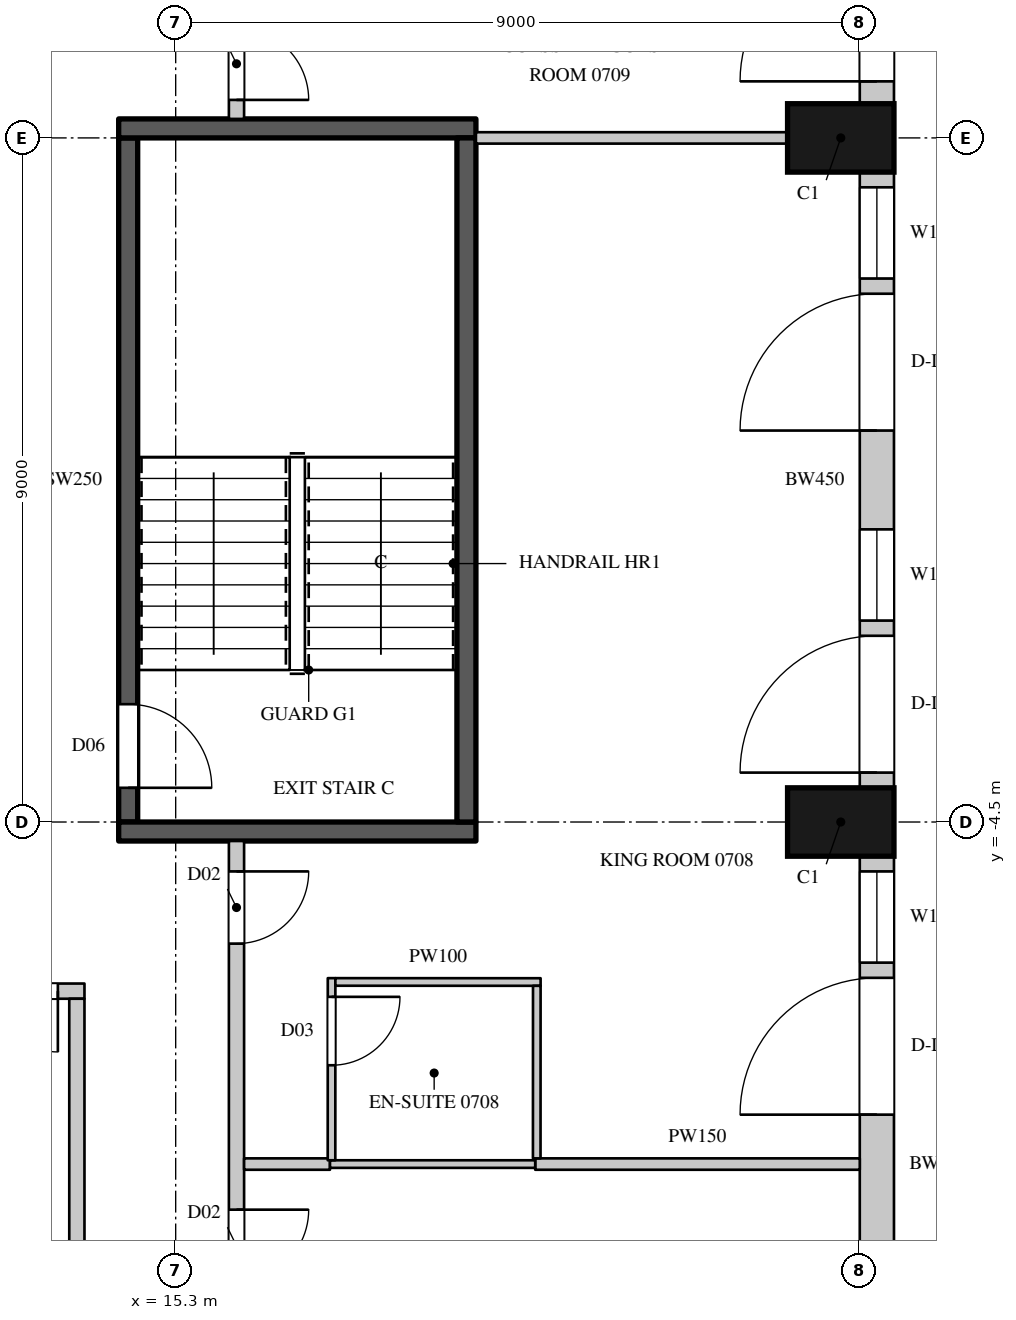
"""IFC4 building model, lengths in metres.
Left out: names, types, materials, properties, quantities, classifications, styles, units other than length and angle.
Written with IfcOpenShell. Run it as: python <this file> out.ifc"""

import sys

from ifc_helpers import new_model, si_unit, direction, frame, frame_2d, origin, origin_2d, place, context, subcontext, project, spatial, rectangle, extrude, element, fill, save


model = new_model("IFC4")
c1 = context("Model", 3, precision=1e-05, world=origin(), true_north=direction((0.0, 1.0)))
c2 = subcontext(c1, "Body", "Model", "MODEL_VIEW")
j1 = project(units=[si_unit("LENGTHUNIT", "METRE"), si_unit("PLANEANGLEUNIT", "RADIAN")], contexts=[c1])
p1 = place(None, origin())
s1 = spatial("IfcSite", under=j1, at=p1, CompositionType="ELEMENT")
p2 = place(p1, origin())
s2 = spatial("IfcBuilding", under=s1, at=p2, CompositionType="ELEMENT")
p3 = place(p2, frame((0.0, 0.0, 55.5)))
s3 = spatial("IfcBuildingStorey", under=s2, at=p3, CompositionType="ELEMENT", Elevation=55.5)
for number, where, z_axis, x_axis in (
    (1, (24.05, -4.5, 0.0), (0.0, 0.0, 1.0), (0.0, 1.0, 0.0)),
    (2, (24.05, 4.5, 0.0), (0.0, 0.0, 1.0), (0.0, 1.0, 0.0)),
):
    element("IfcColumn", number, at=place(p3, frame(where, z_axis=z_axis, x_axis=x_axis)), inside=s3, PredefinedType="COLUMN", context=c2, shape_type="SweptSolid", body=[
        extrude(rectangle(XDim=0.9, YDim=1.4, at=origin_2d()), origin(), (0.0, 0.0, 1.0), 3.6),
    ])
p4 = place(p3, frame((24.525, -13.05, 0.0), z_axis=(0.0, 0.0, 1.0), x_axis=(0.0, 1.0, 0.0)))
e3 = element("IfcWall", 3, at=p4, inside=s3, PredefinedType="SOLIDWALL", context=c2, shape_type="SweptSolid", body=[
    extrude(rectangle(XDim=8.1, YDim=0.45, at=frame_2d((4.05, 0.0))), origin(), (0.0, 0.0, 1.0), 3.3),
])
p5 = place(p4, frame((0.9, 0.0, 0.0)))
e4 = element("IfcOpeningElement", 4, at=p5, cuts=e3, PredefinedType="OPENING", context=c2, shape_type="SweptSolid", body=[
    extrude(rectangle(XDim=1.8, YDim=2.4, at=frame_2d((0.9, 1.2))), frame((0.0, 0.235, 0.0), z_axis=(0.0, -1.0, 0.0), x_axis=(1.0, 0.0, 0.0)), (0.0, 0.0, 1.0), 0.47),
])
p6 = place(p4, frame((4.7, 0.0, 0.0)))
e5 = element("IfcOpeningElement", 5, at=p6, cuts=e3, PredefinedType="OPENING", context=c2, shape_type="SweptSolid", body=[
    extrude(rectangle(XDim=1.8, YDim=2.4, at=frame_2d((0.9, 1.2))), frame((0.0, 0.235, 0.0), z_axis=(0.0, -1.0, 0.0), x_axis=(1.0, 0.0, 0.0)), (0.0, 0.0, 1.0), 0.47),
])
p7 = place(p4, frame((6.7, 0.0, 1.05)))
e6 = element("IfcOpeningElement", 6, at=p7, cuts=e3, PredefinedType="OPENING", context=c2, shape_type="SweptSolid", body=[
    extrude(rectangle(XDim=1.2, YDim=2.0, at=frame_2d((0.6, 1.0))), frame((0.0, 0.235, 0.0), z_axis=(0.0, -1.0, 0.0), x_axis=(1.0, 0.0, 0.0)), (0.0, 0.0, 1.0), 0.47),
])
p8 = place(p3, frame((24.525, -4.05, 0.0), z_axis=(0.0, 0.0, 1.0), x_axis=(0.0, 1.0, 0.0)))
e7 = element("IfcWall", 7, at=p8, inside=s3, PredefinedType="SOLIDWALL", context=c2, shape_type="SweptSolid", body=[
    extrude(rectangle(XDim=8.1, YDim=0.45, at=frame_2d((4.05, 0.0))), origin(), (0.0, 0.0, 1.0), 3.3),
])
p9 = place(p8, frame((0.2, 0.0, 0.0)))
e8 = element("IfcOpeningElement", 8, at=p9, cuts=e7, PredefinedType="OPENING", context=c2, shape_type="SweptSolid", body=[
    extrude(rectangle(XDim=1.8, YDim=2.4, at=frame_2d((0.9, 1.2))), frame((0.0, 0.235, 0.0), z_axis=(0.0, -1.0, 0.0), x_axis=(1.0, 0.0, 0.0)), (0.0, 0.0, 1.0), 0.47),
])
p10 = place(p8, frame((2.2, 0.0, 1.05)))
e9 = element("IfcOpeningElement", 9, at=p10, cuts=e7, PredefinedType="OPENING", context=c2, shape_type="SweptSolid", body=[
    extrude(rectangle(XDim=1.2, YDim=2.0, at=frame_2d((0.6, 1.0))), frame((0.0, 0.235, 0.0), z_axis=(0.0, -1.0, 0.0), x_axis=(1.0, 0.0, 0.0)), (0.0, 0.0, 1.0), 0.47),
])
p11 = place(p8, frame((4.7, 0.0, 0.0)))
e10 = element("IfcOpeningElement", 10, at=p11, cuts=e7, PredefinedType="OPENING", context=c2, shape_type="SweptSolid", body=[
    extrude(rectangle(XDim=1.8, YDim=2.4, at=frame_2d((0.9, 1.2))), frame((0.0, 0.235, 0.0), z_axis=(0.0, -1.0, 0.0), x_axis=(1.0, 0.0, 0.0)), (0.0, 0.0, 1.0), 0.47),
])
p12 = place(p8, frame((6.7, 0.0, 1.05)))
e11 = element("IfcOpeningElement", 11, at=p12, cuts=e7, PredefinedType="OPENING", context=c2, shape_type="SweptSolid", body=[
    extrude(rectangle(XDim=1.2, YDim=2.0, at=frame_2d((0.6, 1.0))), frame((0.0, 0.235, 0.0), z_axis=(0.0, -1.0, 0.0), x_axis=(1.0, 0.0, 0.0)), (0.0, 0.0, 1.0), 0.47),
])
p13 = place(p3, frame((24.525, 4.95, 0.0), z_axis=(0.0, 0.0, 1.0), x_axis=(0.0, 1.0, 0.0)))
e12 = element("IfcWall", 12, at=p13, inside=s3, PredefinedType="SOLIDWALL", context=c2, shape_type="SweptSolid", body=[
    extrude(rectangle(XDim=8.439, YDim=0.45, at=frame_2d((4.219, 0.0))), origin(), (0.0, 0.0, 1.0), 3.3),
])
p14 = place(p13, frame((0.294, 0.0, 0.0)))
e13 = element("IfcOpeningElement", 13, at=p14, cuts=e12, PredefinedType="OPENING", context=c2, shape_type="SweptSolid", body=[
    extrude(rectangle(XDim=1.8, YDim=2.4, at=frame_2d((0.9, 1.2))), frame((0.0, 0.235, 0.0), z_axis=(0.0, -1.0, 0.0), x_axis=(1.0, 0.0, 0.0)), (0.0, 0.0, 1.0), 0.47),
])
p15 = place(p13, frame((2.294, 0.0, 1.05)))
e14 = element("IfcOpeningElement", 14, at=p15, cuts=e12, PredefinedType="OPENING", context=c2, shape_type="SweptSolid", body=[
    extrude(rectangle(XDim=1.2, YDim=2.0, at=frame_2d((0.6, 1.0))), frame((0.0, 0.235, 0.0), z_axis=(0.0, -1.0, 0.0), x_axis=(1.0, 0.0, 0.0)), (0.0, 0.0, 1.0), 0.47),
])
p16 = place(p13, frame((5.232, 0.0, 1.05)))
e15 = element("IfcOpeningElement", 15, at=p16, cuts=e12, PredefinedType="OPENING", context=c2, shape_type="SweptSolid", body=[
    extrude(rectangle(XDim=2.7, YDim=2.0, at=frame_2d((1.35, 1.0))), frame((0.0, 0.235, 0.0), z_axis=(0.0, -1.0, 0.0), x_axis=(1.0, 0.0, 0.0)), (0.0, 0.0, 1.0), 0.47),
])
p17 = place(p3, frame((10.5, -6.725, 0.0), z_axis=(0.0, 0.0, 1.0), x_axis=(1.0, 0.0, 0.0)))
e16 = element("IfcWall", 16, at=p17, inside=s3, PredefinedType="PARTITIONING", context=c2, shape_type="SweptSolid", body=[
    extrude(rectangle(XDim=3.6, YDim=0.2, at=frame_2d((1.8, 0.0))), origin(), (0.0, 0.0, 1.0), 3.3),
])
p18 = place(p17, frame((1.65, 0.0, 0.0)))
e17 = element("IfcOpeningElement", 17, at=p18, cuts=e16, PredefinedType="OPENING", context=c2, shape_type="SweptSolid", body=[
    extrude(rectangle(XDim=1.6, YDim=2.4, at=frame_2d((0.8, 1.2))), frame((0.0, 0.11, 0.0), z_axis=(0.0, -1.0, 0.0), x_axis=(1.0, 0.0, 0.0)), (0.0, 0.0, 1.0), 0.22),
])
p19 = place(p3, frame((14.0, -15.3, 0.0), z_axis=(0.0, 0.0, 1.0), x_axis=(0.0, 1.0, 0.0)))
e18 = element("IfcWall", 18, at=p19, inside=s3, PredefinedType="PARTITIONING", context=c2, shape_type="SweptSolid", body=[
    extrude(rectangle(XDim=8.475, YDim=0.2, at=frame_2d((4.238, 0.0))), origin(), (0.0, 0.0, 1.0), 3.3),
])
p20 = place(p3, frame((16.1, -17.5, 0.0), z_axis=(0.0, 0.0, 1.0), x_axis=(0.0, 1.0, 0.0)))
e19 = element("IfcWall", 19, at=p20, inside=s3, PredefinedType="PARTITIONING", context=c2, shape_type="SweptSolid", body=[
    extrude(rectangle(XDim=12.75, YDim=0.2, at=frame_2d((6.375, 0.0))), origin(), (0.0, 0.0, 1.0), 3.3),
])
p21 = place(p20, frame((2.75, 0.0, 0.0)))
e20 = element("IfcOpeningElement", 20, at=p21, cuts=e19, PredefinedType="OPENING", context=c2, shape_type="SweptSolid", body=[
    extrude(rectangle(XDim=0.95, YDim=2.2, at=frame_2d((0.475, 1.1))), frame((0.0, 0.11, 0.0), z_axis=(0.0, -1.0, 0.0), x_axis=(1.0, 0.0, 0.0)), (0.0, 0.0, 1.0), 0.22),
])
p22 = place(p20, frame((6.95, 0.0, 0.0)))
e21 = element("IfcOpeningElement", 21, at=p22, cuts=e19, PredefinedType="OPENING", context=c2, shape_type="SweptSolid", body=[
    extrude(rectangle(XDim=0.95, YDim=2.2, at=frame_2d((0.475, 1.1))), frame((0.0, 0.11, 0.0), z_axis=(0.0, -1.0, 0.0), x_axis=(1.0, 0.0, 0.0)), (0.0, 0.0, 1.0), 0.22),
])
p23 = place(p20, frame((11.4, 0.0, 0.0)))
e22 = element("IfcOpeningElement", 22, at=p23, cuts=e19, PredefinedType="OPENING", context=c2, shape_type="SweptSolid", body=[
    extrude(rectangle(XDim=0.95, YDim=2.2, at=frame_2d((0.475, 1.1))), frame((0.0, 0.11, 0.0), z_axis=(0.0, -1.0, 0.0), x_axis=(1.0, 0.0, 0.0)), (0.0, 0.0, 1.0), 0.22),
])
p24 = place(p3, frame((16.1, 4.75, 0.0), z_axis=(0.0, 0.0, 1.0), x_axis=(0.0, 1.0, 0.0)))
e23 = element("IfcWall", 23, at=p24, inside=s3, PredefinedType="PARTITIONING", context=c2, shape_type="SweptSolid", body=[
    extrude(rectangle(XDim=12.65, YDim=0.2, at=frame_2d((6.325, 0.0))), origin(), (0.0, 0.0, 1.0), 3.3),
])
p25 = place(p24, frame((0.25, 0.0, 0.0)))
e24 = element("IfcOpeningElement", 24, at=p25, cuts=e23, PredefinedType="OPENING", context=c2, shape_type="SweptSolid", body=[
    extrude(rectangle(XDim=0.95, YDim=2.2, at=frame_2d((0.475, 1.1))), frame((0.0, 0.11, 0.0), z_axis=(0.0, -1.0, 0.0), x_axis=(1.0, 0.0, 0.0)), (0.0, 0.0, 1.0), 0.22),
])
p26 = place(p24, frame((6.9, 0.0, 0.0)))
e25 = element("IfcOpeningElement", 25, at=p26, cuts=e23, PredefinedType="OPENING", context=c2, shape_type="SweptSolid", body=[
    extrude(rectangle(XDim=0.95, YDim=2.2, at=frame_2d((0.475, 1.1))), frame((0.0, 0.11, 0.0), z_axis=(0.0, -1.0, 0.0), x_axis=(1.0, 0.0, 0.0)), (0.0, 0.0, 1.0), 0.22),
])
p27 = place(p3, frame((16.2, -9.0, 0.0), z_axis=(0.0, 0.0, 1.0), x_axis=(1.0, 0.0, 0.0)))
e26 = element("IfcWall", 26, at=p27, inside=s3, PredefinedType="PARTITIONING", context=c2, shape_type="SweptSolid", body=[
    extrude(rectangle(XDim=1.13, YDim=0.15, at=frame_2d((0.565, 0.0))), origin(), (0.0, 0.0, 1.0), 2.65),
])
p28 = place(p3, frame((19.25, 4.5, 0.0), z_axis=(0.0, 0.0, 1.0), x_axis=(1.0, 0.0, 0.0)))
e27 = element("IfcWall", 27, at=p28, inside=s3, PredefinedType="PARTITIONING", context=c2, shape_type="SweptSolid", body=[
    extrude(rectangle(XDim=4.1, YDim=0.15, at=frame_2d((2.05, 0.0))), origin(), (0.0, 0.0, 1.0), 3.3),
])
p29 = place(p3, frame((20.03, -9.0, 0.0), z_axis=(0.0, 0.0, 1.0), x_axis=(1.0, 0.0, 0.0)))
e28 = element("IfcWall", 28, at=p29, inside=s3, PredefinedType="PARTITIONING", context=c2, shape_type="SweptSolid", body=[
    extrude(rectangle(XDim=4.27, YDim=0.15, at=frame_2d((2.135, 0.0))), origin(), (0.0, 0.0, 1.0), 2.65),
])
p30 = place(p3, frame((14.675, -4.5, 0.0), z_axis=(0.0, 0.0, 1.0), x_axis=(0.0, 1.0, 0.0)))
e29 = element("IfcWall", 29, at=p30, inside=s3, PredefinedType="SHEAR", context=c2, shape_type="SweptSolid", body=[
    extrude(rectangle(XDim=9.0, YDim=0.25, at=frame_2d((4.5, 0.0))), origin(), (0.0, 0.0, 1.0), 3.3),
])
p31 = place(p30, frame((0.45, 0.0, 0.0)))
e30 = element("IfcOpeningElement", 30, at=p31, cuts=e29, PredefinedType="OPENING", context=c2, shape_type="SweptSolid", body=[
    extrude(rectangle(XDim=1.1, YDim=2.2, at=frame_2d((0.55, 1.1))), frame((0.0, 0.135, 0.0), z_axis=(0.0, -1.0, 0.0), x_axis=(1.0, 0.0, 0.0)), (0.0, 0.0, 1.0), 0.27),
])
for number, where, z_axis, x_axis in (
    (31, (14.55, -4.625, 0.0), (0.0, 0.0, 1.0), (1.0, 0.0, 0.0)),
    (32, (14.55, 4.625, 0.0), (0.0, 0.0, 1.0), (1.0, 0.0, 0.0)),
):
    element("IfcWall", number, at=place(p3, frame(where, z_axis=z_axis, x_axis=x_axis)), inside=s3, PredefinedType="SHEAR", context=c2, shape_type="SweptSolid", body=[
        extrude(rectangle(XDim=4.7, YDim=0.25, at=frame_2d((2.35, 0.0))), origin(), (0.0, 0.0, 1.0), 3.3),
    ])
p32 = place(p3, frame((19.125, -4.5, 0.0), z_axis=(0.0, 0.0, 1.0), x_axis=(0.0, 1.0, 0.0)))
e33 = element("IfcWall", 33, at=p32, inside=s3, PredefinedType="SHEAR", context=c2, shape_type="SweptSolid", body=[
    extrude(rectangle(XDim=9.0, YDim=0.25, at=frame_2d((4.5, 0.0))), origin(), (0.0, 0.0, 1.0), 3.3),
])
p33 = place(p3, frame((17.33, -9.0, 0.0), z_axis=(0.0, 0.0, 1.0), x_axis=(1.0, 0.0, 0.0)))
e34 = element("IfcWall", 34, at=p33, inside=s3, PredefinedType="PARTITIONING", context=c2, shape_type="SweptSolid", body=[
    extrude(rectangle(XDim=2.7, YDim=0.1, at=frame_2d((1.35, 0.0))), origin(), (0.0, 0.0, 1.0), 2.65),
])
p34 = place(p3, frame((17.35, -8.95, 0.0), z_axis=(0.0, 0.0, 1.0), x_axis=(0.000407580973, 0.999999916939, 0.0)))
e35 = element("IfcWall", 35, at=p34, inside=s3, PredefinedType="PARTITIONING", context=c2, shape_type="SweptSolid", body=[
    extrude(rectangle(XDim=2.396, YDim=0.1, at=frame_2d((1.198, 0.0))), origin(), (0.0, 0.0, 1.0), 3.3),
])
p35 = place(p34, frame((1.25, 0.0, 0.0)))
e36 = element("IfcOpeningElement", 36, at=p35, cuts=e35, PredefinedType="OPENING", context=c2, shape_type="SweptSolid", body=[
    extrude(rectangle(XDim=0.9, YDim=2.2, at=frame_2d((0.45, 1.1))), frame((0.0, 0.06, 0.0), z_axis=(0.0, -1.0, 0.0), x_axis=(1.0, 0.0, 0.0)), (0.0, 0.0, 1.0), 0.12),
])
p36 = place(p3, frame((17.401, -6.604, 0.0), z_axis=(0.0, 0.0, 1.0), x_axis=(0.9999999346, -0.000361663629, 0.0)))
e37 = element("IfcWall", 37, at=p36, inside=s3, PredefinedType="PARTITIONING", context=c2, shape_type="SweptSolid", body=[
    extrude(rectangle(XDim=2.7, YDim=0.1, at=frame_2d((1.35, 0.0))), origin(), (0.0, 0.0, 1.0), 3.3),
])
p37 = place(p3, frame((20.05, -8.925, 0.0), z_axis=(0.0, 0.0, 1.0), x_axis=(0.000430200003, 0.999999907464, 0.0)))
e38 = element("IfcWall", 38, at=p37, inside=s3, PredefinedType="PARTITIONING", context=c2, shape_type="SweptSolid", body=[
    extrude(rectangle(XDim=2.27, YDim=0.1, at=frame_2d((1.135, 0.0))), origin(), (0.0, 0.0, 1.0), 3.3),
])
p38 = place(p6, origin())
e39 = element("IfcDoor", 39, at=p38, inside=s3, OperationType="SLIDING_TO_LEFT", PredefinedType="DOOR", context=c2, shape_type="SweptSolid", body=[
    extrude(rectangle(XDim=1.8, YDim=2.4, at=frame_2d((0.9, 1.2))), frame((0.0, 0.13, 0.0), z_axis=(0.0, -1.0, 0.0), x_axis=(1.0, 0.0, 0.0)), (0.0, 0.0, 1.0), 0.05),
])
fill(e5, e39)
p39 = place(p7, origin())
e40 = element("IfcWindow", 40, at=p39, inside=s3, PartitioningType="SINGLE_PANEL", PredefinedType="WINDOW", context=c2, shape_type="SweptSolid", body=[
    extrude(rectangle(XDim=1.2, YDim=2.0, at=frame_2d((0.6, 1.0))), frame((0.0, 0.135, 0.0), z_axis=(0.0, -1.0, 0.0), x_axis=(1.0, 0.0, 0.0)), (0.0, 0.0, 1.0), 0.06),
])
fill(e6, e40)
p40 = place(p9, origin())
e41 = element("IfcDoor", 41, at=p40, inside=s3, OperationType="SLIDING_TO_LEFT", PredefinedType="DOOR", context=c2, shape_type="SweptSolid", body=[
    extrude(rectangle(XDim=1.8, YDim=2.4, at=frame_2d((0.9, 1.2))), frame((0.0, 0.13, 0.0), z_axis=(0.0, -1.0, 0.0), x_axis=(1.0, 0.0, 0.0)), (0.0, 0.0, 1.0), 0.05),
])
fill(e8, e41)
p41 = place(p10, origin())
e42 = element("IfcWindow", 42, at=p41, inside=s3, PartitioningType="SINGLE_PANEL", PredefinedType="WINDOW", context=c2, shape_type="SweptSolid", body=[
    extrude(rectangle(XDim=1.2, YDim=2.0, at=frame_2d((0.6, 1.0))), frame((0.0, 0.135, 0.0), z_axis=(0.0, -1.0, 0.0), x_axis=(1.0, 0.0, 0.0)), (0.0, 0.0, 1.0), 0.06),
])
fill(e9, e42)
p42 = place(p11, origin())
e43 = element("IfcDoor", 43, at=p42, inside=s3, OperationType="SLIDING_TO_LEFT", PredefinedType="DOOR", context=c2, shape_type="SweptSolid", body=[
    extrude(rectangle(XDim=1.8, YDim=2.4, at=frame_2d((0.9, 1.2))), frame((0.0, 0.13, 0.0), z_axis=(0.0, -1.0, 0.0), x_axis=(1.0, 0.0, 0.0)), (0.0, 0.0, 1.0), 0.05),
])
fill(e10, e43)
p43 = place(p12, origin())
e44 = element("IfcWindow", 44, at=p43, inside=s3, PartitioningType="SINGLE_PANEL", PredefinedType="WINDOW", context=c2, shape_type="SweptSolid", body=[
    extrude(rectangle(XDim=1.2, YDim=2.0, at=frame_2d((0.6, 1.0))), frame((0.0, 0.135, 0.0), z_axis=(0.0, -1.0, 0.0), x_axis=(1.0, 0.0, 0.0)), (0.0, 0.0, 1.0), 0.06),
])
fill(e11, e44)
p44 = place(p14, origin())
e45 = element("IfcDoor", 45, at=p44, inside=s3, OperationType="SLIDING_TO_LEFT", PredefinedType="DOOR", context=c2, shape_type="SweptSolid", body=[
    extrude(rectangle(XDim=1.8, YDim=2.4, at=frame_2d((0.9, 1.2))), frame((0.0, 0.13, 0.0), z_axis=(0.0, -1.0, 0.0), x_axis=(1.0, 0.0, 0.0)), (0.0, 0.0, 1.0), 0.05),
])
fill(e13, e45)
p45 = place(p18, origin())
e46 = element("IfcDoor", 46, at=p45, inside=s3, OperationType="DOUBLE_DOOR_SINGLE_SWING", PredefinedType="DOOR", context=c2, shape_type="SweptSolid", body=[
    extrude(rectangle(XDim=1.6, YDim=2.4, at=frame_2d((0.8, 1.2))), frame((0.0, 0.025, 0.0), z_axis=(0.0, -1.0, 0.0), x_axis=(1.0, 0.0, 0.0)), (0.0, 0.0, 1.0), 0.05),
])
fill(e17, e46)
p46 = place(p22, origin())
e47 = element("IfcDoor", 47, at=p46, inside=s3, OperationType="SINGLE_SWING_LEFT", PredefinedType="DOOR", context=c2, shape_type="SweptSolid", body=[
    extrude(rectangle(XDim=0.95, YDim=2.2, at=frame_2d((0.475, 1.1))), frame((0.0, 0.025, 0.0), z_axis=(0.0, -1.0, 0.0), x_axis=(1.0, 0.0, 0.0)), (0.0, 0.0, 1.0), 0.05),
])
fill(e21, e47)
p47 = place(p23, origin())
e48 = element("IfcDoor", 48, at=p47, inside=s3, OperationType="SINGLE_SWING_LEFT", PredefinedType="DOOR", context=c2, shape_type="SweptSolid", body=[
    extrude(rectangle(XDim=0.95, YDim=2.2, at=frame_2d((0.475, 1.1))), frame((0.0, 0.025, 0.0), z_axis=(0.0, -1.0, 0.0), x_axis=(1.0, 0.0, 0.0)), (0.0, 0.0, 1.0), 0.05),
])
fill(e22, e48)
p48 = place(p35, origin())
e49 = element("IfcDoor", 49, at=p48, inside=s3, OperationType="SINGLE_SWING_LEFT", PredefinedType="DOOR", context=c2, shape_type="SweptSolid", body=[
    extrude(rectangle(XDim=0.9, YDim=2.2, at=frame_2d((0.45, 1.1))), frame((0.0, 0.025, 0.0), z_axis=(0.0, -1.0, 0.0), x_axis=(1.0, 0.0, 0.0)), (0.0, 0.0, 1.0), 0.05),
])
fill(e36, e49)
p49 = place(p25, origin())
e50 = element("IfcDoor", 50, at=p49, inside=s3, OperationType="SINGLE_SWING_RIGHT", PredefinedType="DOOR", context=c2, shape_type="SweptSolid", body=[
    extrude(rectangle(XDim=0.95, YDim=2.2, at=frame_2d((0.475, 1.1))), frame((0.0, 0.025, 0.0), z_axis=(0.0, -1.0, 0.0), x_axis=(1.0, 0.0, 0.0)), (0.0, 0.0, 1.0), 0.05),
])
fill(e24, e50)
p50 = place(p31, origin())
e51 = element("IfcDoor", 51, at=p50, inside=s3, OperationType="SINGLE_SWING_RIGHT", PredefinedType="DOOR", context=c2, shape_type="SweptSolid", body=[
    extrude(rectangle(XDim=1.1, YDim=2.2, at=frame_2d((0.55, 1.1))), frame((0.0, 0.025, 0.0), z_axis=(0.0, -1.0, 0.0), x_axis=(1.0, 0.0, 0.0)), (0.0, 0.0, 1.0), 0.05),
])
fill(e30, e51)
save(model, sys.argv[1])
